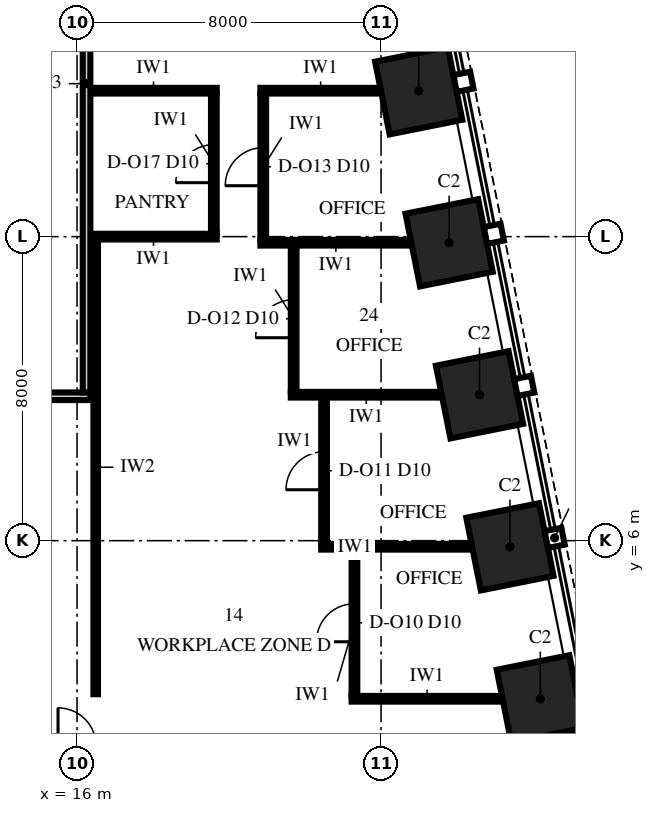
"""IFC4 building model, lengths in metres.
Left out: names, types, materials, properties, quantities, classifications, styles, units other than length and angle.
Written with IfcOpenShell. Run it as: python <this file> out.ifc"""

import sys

from ifc_helpers import new_model, si_unit, direction, frame, frame_2d, origin, origin_2d, place, context, subcontext, project, spatial, rectangle, extrude, element, fill, save


model = new_model("IFC4")
c1 = context("Model", 3, precision=1e-05, world=origin(), true_north=direction((0.0, 1.0)))
c2 = subcontext(c1, "Body", "Model", "MODEL_VIEW")
j1 = project(units=[si_unit("LENGTHUNIT", "METRE"), si_unit("PLANEANGLEUNIT", "RADIAN")], contexts=[c1])
p1 = place(None, origin())
s1 = spatial("IfcSite", under=j1, at=p1, CompositionType="ELEMENT")
p2 = place(p1, origin())
s2 = spatial("IfcBuilding", under=s1, at=p2, CompositionType="ELEMENT")
p3 = place(p2, frame((0.0, 0.0, 60.0)))
s3 = spatial("IfcBuildingStorey", under=s2, at=p3, CompositionType="ELEMENT", Elevation=60.0)
for number, where, z_axis, x_axis in (
    (1, (28.191, 1.838, 0.0), (0.0, 0.0, 1.0), (-0.196, 0.981, 0.0)),
    (2, (27.391, 5.838, 0.0), (0.0, 0.0, 1.0), (-0.196, 0.981, 0.0)),
    (3, (26.591, 9.838, 0.0), (0.0, 0.0, 1.0), (-0.196, 0.981, 0.0)),
    (4, (25.791, 13.838, 0.0), (0.0, 0.0, 1.0), (-0.196, 0.981, 0.0)),
    (5, (24.991, 17.838, 0.0), (0.0, 0.0, 1.0), (-0.196, 0.981, 0.0)),
):
    element("IfcColumn", number, at=place(p3, frame(where, z_axis=z_axis, x_axis=x_axis)), inside=s3, PredefinedType="COLUMN", context=c2, shape_type="SweptSolid", body=[
        extrude(rectangle(XDim=1.95, YDim=1.95, at=origin_2d()), origin(), (0.0, 0.0, 1.0), 4.0),
    ])
p4 = place(p3, frame((23.225, 1.84, 0.0), z_axis=(0.0, 0.0, 1.0), x_axis=(1.0, 0.0, 0.0)))
e6 = element("IfcWall", 6, at=p4, inside=s3, PredefinedType="PARTITIONING", context=c2, shape_type="SweptSolid", body=[
    extrude(rectangle(XDim=3.971, YDim=0.15, at=frame_2d((1.986, 0.0))), origin(), (0.0, 0.0, 1.0), 3.25),
])
p5 = place(p3, frame((22.425, 5.84, 0.0), z_axis=(0.0, 0.0, 1.0), x_axis=(1.0, 0.0, 0.0)))
e7 = element("IfcWall", 7, at=p5, inside=s3, PredefinedType="PARTITIONING", context=c2, shape_type="SweptSolid", body=[
    extrude(rectangle(XDim=3.971, YDim=0.15, at=frame_2d((1.986, 0.0))), origin(), (0.0, 0.0, 1.0), 2.842),
])
p6 = place(p3, frame((14.33, 9.8, 0.0), z_axis=(0.0, 0.0, 1.0), x_axis=(1.0, 0.0, 0.0)))
e8 = element("IfcWall", 8, at=p6, inside=s3, PredefinedType="PARTITIONING", context=c2, shape_type="SweptSolid", body=[
    extrude(rectangle(XDim=2.02, YDim=0.2, at=frame_2d((1.01, 0.0))), origin(), (0.0, 0.0, 1.0), 3.85),
])
for number, where, z_axis, x_axis in (
    (9, (21.625, 9.84, 0.0), (0.0, 0.0, 1.0), (1.0, 0.0, 0.0)),
    (10, (20.825, 13.84, 0.0), (0.0, 0.0, 1.0), (1.0, 0.0, 0.0)),
):
    element("IfcWall", number, at=place(p3, frame(where, z_axis=z_axis, x_axis=x_axis)), inside=s3, PredefinedType="PARTITIONING", context=c2, shape_type="SweptSolid", body=[
        extrude(rectangle(XDim=3.971, YDim=0.15, at=frame_2d((1.986, 0.0))), origin(), (0.0, 0.0, 1.0), 3.25),
    ])
p7 = place(p3, frame((16.35, 14.0, 0.0), z_axis=(0.0, 0.0, 1.0), x_axis=(1.0, 0.0, 0.0)))
e11 = element("IfcWall", 11, at=p7, inside=s3, PredefinedType="PARTITIONING", context=c2, shape_type="SweptSolid", body=[
    extrude(rectangle(XDim=3.325, YDim=0.15, at=frame_2d((1.663, 0.0))), origin(), (0.0, 0.0, 1.0), 3.85),
])
p8 = place(p3, frame((16.35, 17.84, 0.0), z_axis=(0.0, 0.0, 1.0), x_axis=(1.0, 0.0, 0.0)))
e12 = element("IfcWall", 12, at=p8, inside=s3, PredefinedType="PARTITIONING", context=c2, shape_type="SweptSolid", body=[
    extrude(rectangle(XDim=3.325, YDim=0.15, at=frame_2d((1.663, 0.0))), origin(), (0.0, 0.0, 1.0), 3.25),
])
p9 = place(p3, frame((20.825, 17.84, 0.0), z_axis=(0.0, 0.0, 1.0), x_axis=(1.0, 0.0, 0.0)))
e13 = element("IfcWall", 13, at=p9, inside=s3, PredefinedType="PARTITIONING", context=c2, shape_type="SweptSolid", body=[
    extrude(rectangle(XDim=3.171, YDim=0.15, at=frame_2d((1.586, 0.0))), origin(), (0.0, 0.0, 1.0), 3.25),
])
p10 = place(p3, frame((16.25, 9.9, 0.0), z_axis=(0.0, 0.0, 1.0), x_axis=(0.0, 1.0, 0.0)))
e14 = element("IfcWall", 14, at=p10, inside=s3, PredefinedType="PARTITIONING", context=c2, shape_type="SweptSolid", body=[
    extrude(rectangle(XDim=16.25, YDim=0.2, at=frame_2d((8.125, 0.0))), origin(), (0.0, 0.0, 1.0), 3.25),
])
p11 = place(p3, frame((19.6, 14.075, 0.0), z_axis=(0.0, 0.0, 1.0), x_axis=(0.0, 1.0, 0.0)))
e15 = element("IfcWall", 15, at=p11, inside=s3, PredefinedType="PARTITIONING", context=c2, shape_type="SweptSolid", body=[
    extrude(rectangle(XDim=3.69, YDim=0.15, at=frame_2d((1.845, 0.0))), origin(), (0.0, 0.0, 1.0), 3.25),
])
p12 = place(p11, frame((1.345, 0.0, 0.0)))
e16 = element("IfcOpeningElement", 16, at=p12, cuts=e15, PredefinedType="OPENING", context=c2, shape_type="SweptSolid", body=[
    extrude(rectangle(XDim=1.0, YDim=2.3, at=frame_2d((0.5, 1.15))), frame((0.0, 0.09, 0.0), z_axis=(0.0, -1.0, 0.0), x_axis=(1.0, 0.0, 0.0)), (0.0, 0.0, 1.0), 0.18),
])
p13 = place(p3, frame((20.9, 13.915, 0.0), z_axis=(0.0, 0.0, 1.0), x_axis=(0.0, 1.0, 0.0)))
e17 = element("IfcWall", 17, at=p13, inside=s3, PredefinedType="PARTITIONING", context=c2, shape_type="SweptSolid", body=[
    extrude(rectangle(XDim=3.85, YDim=0.15, at=frame_2d((1.925, 0.0))), origin(), (0.0, 0.0, 1.0), 3.25),
])
p14 = place(p13, frame((1.425, 0.0, 0.0)))
e18 = element("IfcOpeningElement", 18, at=p14, cuts=e17, PredefinedType="OPENING", context=c2, shape_type="SweptSolid", body=[
    extrude(rectangle(XDim=1.0, YDim=2.3, at=frame_2d((0.5, 1.15))), frame((0.0, 0.09, 0.0), z_axis=(0.0, -1.0, 0.0), x_axis=(1.0, 0.0, 0.0)), (0.0, 0.0, 1.0), 0.18),
])
p15 = place(p3, frame((21.7, 9.915, 0.0), z_axis=(0.0, 0.0, 1.0), x_axis=(0.0, 1.0, 0.0)))
e19 = element("IfcWall", 19, at=p15, inside=s3, PredefinedType="PARTITIONING", context=c2, shape_type="SweptSolid", body=[
    extrude(rectangle(XDim=3.85, YDim=0.15, at=frame_2d((1.925, 0.0))), origin(), (0.0, 0.0, 1.0), 3.85),
])
p16 = place(p15, frame((1.425, 0.0, 0.0)))
e20 = element("IfcOpeningElement", 20, at=p16, cuts=e19, PredefinedType="OPENING", context=c2, shape_type="SweptSolid", body=[
    extrude(rectangle(XDim=1.0, YDim=2.3, at=frame_2d((0.5, 1.15))), frame((0.0, 0.09, 0.0), z_axis=(0.0, -1.0, 0.0), x_axis=(1.0, 0.0, 0.0)), (0.0, 0.0, 1.0), 0.18),
])
p17 = place(p3, frame((22.5, 5.915, 0.0), z_axis=(0.0, 0.0, 1.0), x_axis=(0.0, 1.0, 0.0)))
e21 = element("IfcWall", 21, at=p17, inside=s3, PredefinedType="PARTITIONING", context=c2, shape_type="SweptSolid", body=[
    extrude(rectangle(XDim=3.85, YDim=0.15, at=frame_2d((1.925, 0.0))), origin(), (0.0, 0.0, 1.0), 2.842),
])
p18 = place(p17, frame((1.425, 0.0, 0.0)))
e22 = element("IfcOpeningElement", 22, at=p18, cuts=e21, PredefinedType="OPENING", context=c2, shape_type="SweptSolid", body=[
    extrude(rectangle(XDim=1.0, YDim=2.3, at=frame_2d((0.5, 1.15))), frame((0.0, 0.09, 0.0), z_axis=(0.0, -1.0, 0.0), x_axis=(1.0, 0.0, 0.0)), (0.0, 0.0, 1.0), 0.18),
])
p19 = place(p3, frame((23.3, 1.915, 0.0), z_axis=(0.0, 0.0, 1.0), x_axis=(0.0, 1.0, 0.0)))
e23 = element("IfcWall", 23, at=p19, inside=s3, PredefinedType="PARTITIONING", context=c2, shape_type="SweptSolid", body=[
    extrude(rectangle(XDim=3.85, YDim=0.15, at=frame_2d((1.925, 0.0))), origin(), (0.0, 0.0, 1.0), 3.85),
])
p20 = place(p19, frame((1.425, 0.0, 0.0)))
e24 = element("IfcOpeningElement", 24, at=p20, cuts=e23, PredefinedType="OPENING", context=c2, shape_type="SweptSolid", body=[
    extrude(rectangle(XDim=1.0, YDim=2.3, at=frame_2d((0.5, 1.15))), frame((0.0, 0.09, 0.0), z_axis=(0.0, -1.0, 0.0), x_axis=(1.0, 0.0, 0.0)), (0.0, 0.0, 1.0), 0.18),
])
p21 = place(p3, frame((16.491, 1.96, 0.0), z_axis=(0.0, 0.0, 1.0), x_axis=(0.0, 1.0, 0.0)))
e25 = element("IfcWall", 25, at=p21, inside=s3, PredefinedType="PARTITIONING", context=c2, shape_type="SweptSolid", body=[
    extrude(rectangle(XDim=11.945, YDim=0.12, at=frame_2d((5.973, 0.0))), origin(), (0.0, 0.0, 1.0), 2.842),
])
p22 = place(p20, origin())
e26 = element("IfcDoor", 26, at=p22, inside=s3, OperationType="SINGLE_SWING_LEFT", PredefinedType="DOOR", context=c2, shape_type="SweptSolid", body=[
    extrude(rectangle(XDim=1.0, YDim=2.3, at=frame_2d((0.5, 1.15))), frame((0.0, 0.075, 0.0), z_axis=(0.0, -1.0, 0.0), x_axis=(1.0, 0.0, 0.0)), (0.0, 0.0, 1.0), 0.149),
])
fill(e24, e26)
p23 = place(p18, origin())
e27 = element("IfcDoor", 27, at=p23, inside=s3, OperationType="SINGLE_SWING_LEFT", PredefinedType="DOOR", context=c2, shape_type="SweptSolid", body=[
    extrude(rectangle(XDim=1.0, YDim=2.3, at=frame_2d((0.5, 1.15))), frame((0.0, 0.075, 0.0), z_axis=(0.0, -1.0, 0.0), x_axis=(1.0, 0.0, 0.0)), (0.0, 0.0, 1.0), 0.149),
])
fill(e22, e27)
p24 = place(p16, origin())
e28 = element("IfcDoor", 28, at=p24, inside=s3, OperationType="SINGLE_SWING_LEFT", PredefinedType="DOOR", context=c2, shape_type="SweptSolid", body=[
    extrude(rectangle(XDim=1.0, YDim=2.3, at=frame_2d((0.5, 1.15))), frame((0.0, 0.075, 0.0), z_axis=(0.0, -1.0, 0.0), x_axis=(1.0, 0.0, 0.0)), (0.0, 0.0, 1.0), 0.149),
])
fill(e20, e28)
p25 = place(p14, origin())
e29 = element("IfcDoor", 29, at=p25, inside=s3, OperationType="SINGLE_SWING_LEFT", PredefinedType="DOOR", context=c2, shape_type="SweptSolid", body=[
    extrude(rectangle(XDim=1.0, YDim=2.3, at=frame_2d((0.5, 1.15))), frame((0.0, 0.075, 0.0), z_axis=(0.0, -1.0, 0.0), x_axis=(1.0, 0.0, 0.0)), (0.0, 0.0, 1.0), 0.149),
])
fill(e18, e29)
p26 = place(p12, origin())
e30 = element("IfcDoor", 30, at=p26, inside=s3, OperationType="SINGLE_SWING_LEFT", PredefinedType="DOOR", context=c2, shape_type="SweptSolid", body=[
    extrude(rectangle(XDim=1.0, YDim=2.3, at=frame_2d((0.5, 1.15))), frame((0.0, 0.075, 0.0), z_axis=(0.0, -1.0, 0.0), x_axis=(1.0, 0.0, 0.0)), (0.0, 0.0, 1.0), 0.149),
])
fill(e16, e30)
save(model, sys.argv[1])
